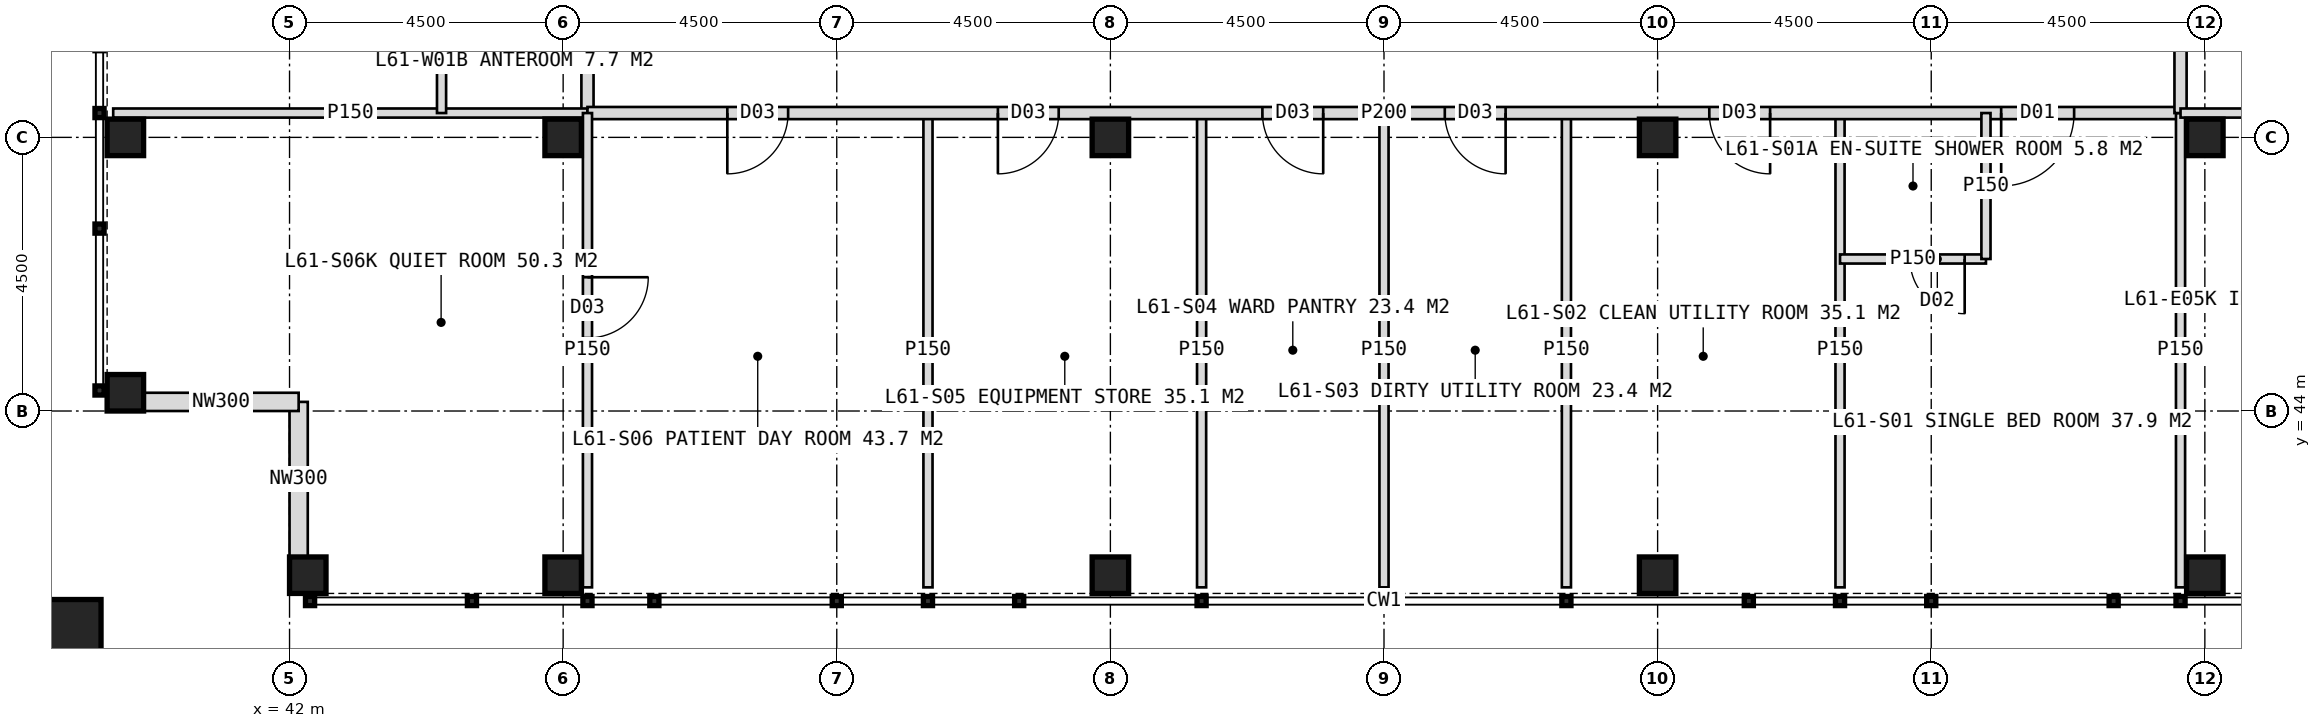
"""IFC4 building model, lengths in metres.
Left out: names, types, materials, properties, quantities, classifications, styles, units other than length and angle.
Written with IfcOpenShell. Run it as: python <this file> out.ifc"""

import sys

from ifc_helpers import new_model, si_unit, direction, frame, frame_2d, origin, origin_2d, place, context, subcontext, project, spatial, rectangle, hollow_rectangle, extrude, element, fill, save


model = new_model("IFC4")
c1 = context("Model", 3, precision=1e-05, world=origin(), true_north=direction((0.0, 1.0)))
c2 = subcontext(c1, "Body", "Model", "MODEL_VIEW")
j1 = project(units=[si_unit("LENGTHUNIT", "METRE"), si_unit("PLANEANGLEUNIT", "RADIAN")], contexts=[c1])
p1 = place(None, origin())
s1 = spatial("IfcSite", under=j1, at=p1, CompositionType="ELEMENT")
p2 = place(p1, origin())
s2 = spatial("IfcBuilding", under=s1, at=p2, CompositionType="ELEMENT")
p3 = place(p2, frame((0.0, 0.0, 254.0)))
s3 = spatial("IfcBuildingStorey", under=s2, at=p3, CompositionType="ELEMENT", Elevation=254.0)
for number, where, z_axis, x_axis in (
    (1, (46.5, 48.5, 0.0), (0.0, 0.0, 1.0), (1.0, 0.0, 0.0)),
    (2, (73.5, 48.5, 0.0), (0.0, 0.0, 1.0), (1.0, 0.0, 0.0)),
    (3, (55.5, 48.5, 0.0), (0.0, 0.0, 1.0), (1.0, 0.0, 0.0)),
    (4, (64.5, 48.5, 0.0), (0.0, 0.0, 1.0), (1.0, 0.0, 0.0)),
    (5, (42.3, 41.3, 0.0), (0.0, 0.0, 1.0), (1.0, 0.0, 0.0)),
    (6, (39.3, 44.3, 0.0), (0.0, 0.0, 1.0), (1.0, 0.0, 0.0)),
    (7, (46.5, 41.3, 0.0), (0.0, 0.0, 1.0), (1.0, 0.0, 0.0)),
    (8, (39.3, 48.5, 0.0), (0.0, 0.0, 1.0), (1.0, 0.0, 0.0)),
    (9, (55.5, 41.3, 0.0), (0.0, 0.0, 1.0), (1.0, 0.0, 0.0)),
    (10, (64.5, 41.3, 0.0), (0.0, 0.0, 1.0), (1.0, 0.0, 0.0)),
    (11, (73.5, 41.3, 0.0), (0.0, 0.0, 1.0), (1.0, 0.0, 0.0)),
):
    element("IfcColumn", number, at=place(p3, frame(where, z_axis=z_axis, x_axis=x_axis)), inside=s3, PredefinedType="COLUMN", context=c2, shape_type="SweptSolid", body=[
        extrude(hollow_rectangle(XDim=0.6, YDim=0.6, WallThickness=0.04, at=origin_2d()), origin(), (0.0, 0.0, 1.0), 4.0),
    ])
p4 = place(p3, frame((38.4, 40.4, 0.0), z_axis=(0.0, 0.0, 1.0), x_axis=(1.0, 0.0, 0.0)))
e12 = element("IfcColumn", 12, at=p4, inside=s3, PredefinedType="COLUMN", context=c2, shape_type="SweptSolid", body=[
    extrude(hollow_rectangle(XDim=1.0, YDim=1.0, WallThickness=0.06, at=origin_2d()), origin(), (0.0, 0.0, 1.0), 4.0),
])
for number, where, z_axis, x_axis in (
    (13, (42.15, 41.6, 0.0), (0.0, 0.0, 1.0), (0.0, 1.0, 0.0)),
    (14, (42.15, 44.15, 0.0), (0.0, 0.0, 1.0), (-1.0, 0.0, 0.0)),
):
    element("IfcWall", number, at=place(p3, frame(where, z_axis=z_axis, x_axis=x_axis)), inside=s3, PredefinedType="ELEMENTEDWALL", context=c2, shape_type="SweptSolid", body=[
        extrude(rectangle(XDim=2.55, YDim=0.3, at=frame_2d((1.275, 0.0))), origin(), (0.0, 0.0, 1.0), 2.95),
    ])
p5 = place(p3, frame((46.9, 48.9, 0.0), z_axis=(0.0, 0.0, 1.0), x_axis=(0.0, 1.0, 0.0)))
e15 = element("IfcWall", 15, at=p5, inside=s3, PredefinedType="PARTITIONING", context=c2, shape_type="SweptSolid", body=[
    extrude(rectangle(XDim=26.2, YDim=0.2, at=frame_2d((13.1, 0.0))), origin(), (0.0, 0.0, 1.0), 3.75),
])
p6 = place(p5, frame((1.75, 0.0, 0.0)))
e16 = element("IfcOpeningElement", 16, at=p6, cuts=e15, PredefinedType="OPENING", context=c2, shape_type="SweptSolid", body=[
    extrude(rectangle(XDim=1.2, YDim=2.2, at=frame_2d((0.6, 1.1))), frame((0.0, 0.11, 0.0), z_axis=(0.0, -1.0, 0.0), x_axis=(1.0, 0.0, 0.0)), (0.0, 0.0, 1.0), 0.22),
])
p7 = place(p5, frame((6.75, 0.0, 0.0)))
e17 = element("IfcOpeningElement", 17, at=p7, cuts=e15, PredefinedType="OPENING", context=c2, shape_type="SweptSolid", body=[
    extrude(rectangle(XDim=1.0, YDim=2.1, at=frame_2d((0.5, 1.05))), frame((0.0, 0.11, 0.0), z_axis=(0.0, -1.0, 0.0), x_axis=(1.0, 0.0, 0.0)), (0.0, 0.0, 1.0), 0.22),
])
p8 = place(p5, frame((11.1, 0.0, 0.0)))
e18 = element("IfcOpeningElement", 18, at=p8, cuts=e15, PredefinedType="OPENING", context=c2, shape_type="SweptSolid", body=[
    extrude(rectangle(XDim=1.0, YDim=2.1, at=frame_2d((0.5, 1.05))), frame((0.0, 0.11, 0.0), z_axis=(0.0, -1.0, 0.0), x_axis=(1.0, 0.0, 0.0)), (0.0, 0.0, 1.0), 0.22),
])
p9 = place(p5, frame((18.45, 0.0, 0.0)))
e19 = element("IfcOpeningElement", 19, at=p9, cuts=e15, PredefinedType="OPENING", context=c2, shape_type="SweptSolid", body=[
    extrude(rectangle(XDim=1.2, YDim=2.2, at=frame_2d((0.6, 1.1))), frame((0.0, 0.11, 0.0), z_axis=(0.0, -1.0, 0.0), x_axis=(1.0, 0.0, 0.0)), (0.0, 0.0, 1.0), 0.22),
])
p10 = place(p5, frame((23.25, 0.0, 0.0)))
e20 = element("IfcOpeningElement", 20, at=p10, cuts=e15, PredefinedType="OPENING", context=c2, shape_type="SweptSolid", body=[
    extrude(rectangle(XDim=1.2, YDim=2.2, at=frame_2d((0.6, 1.1))), frame((0.0, 0.11, 0.0), z_axis=(0.0, -1.0, 0.0), x_axis=(1.0, 0.0, 0.0)), (0.0, 0.0, 1.0), 0.22),
])
p11 = place(p3, frame((46.9, 48.9, 0.0), z_axis=(0.0, 0.0, 1.0), x_axis=(-1.0, 0.0, 0.0)))
e21 = element("IfcWall", 21, at=p11, inside=s3, PredefinedType="PARTITIONING", context=c2, shape_type="SweptSolid", body=[
    extrude(rectangle(XDim=7.8, YDim=0.15, at=frame_2d((3.9, 0.0))), origin(), (0.0, 0.0, 1.0), 3.75),
])
p12 = place(p3, frame((44.5, 48.9, 0.0), z_axis=(0.0, 0.0, 1.0), x_axis=(0.0, 1.0, 0.0)))
e22 = element("IfcWall", 22, at=p12, inside=s3, PredefinedType="PARTITIONING", context=c2, shape_type="SweptSolid", body=[
    extrude(rectangle(XDim=3.2, YDim=0.15, at=frame_2d((1.6, 0.0))), origin(), (0.0, 0.0, 1.0), 3.75),
])
p13 = place(p12, frame((1.75, 0.0, 0.0)))
e23 = element("IfcOpeningElement", 23, at=p13, cuts=e22, PredefinedType="OPENING", context=c2, shape_type="SweptSolid", body=[
    extrude(rectangle(XDim=1.2, YDim=2.2, at=frame_2d((0.6, 1.1))), frame((0.0, 0.085, 0.0), z_axis=(0.0, -1.0, 0.0), x_axis=(1.0, 0.0, 0.0)), (0.0, 0.0, 1.0), 0.17),
])
for number, where, z_axis, x_axis in (
    (24, (67.5, 48.9, 0.0), (0.0, 0.0, 1.0), (0.0, -1.0, 0.0)),
    (25, (63.0, 48.9, 0.0), (0.0, 0.0, 1.0), (0.0, -1.0, 0.0)),
):
    element("IfcWall", number, at=place(p3, frame(where, z_axis=z_axis, x_axis=x_axis)), inside=s3, PredefinedType="PARTITIONING", context=c2, shape_type="SweptSolid", body=[
        extrude(rectangle(XDim=7.8, YDim=0.15, at=frame_2d((3.9, 0.0))), origin(), (0.0, 0.0, 1.0), 3.75),
    ])
p14 = place(p3, frame((60.0, 48.9, 0.0), z_axis=(0.0, 0.0, 1.0), x_axis=(0.0, -1.0, 0.0)))
e26 = element("IfcWall", 26, at=p14, inside=s3, PredefinedType="PARTITIONING", context=c2, shape_type="SweptSolid", body=[
    extrude(rectangle(XDim=7.8, YDim=0.15, at=frame_2d((3.9, 0.0))), origin(), (0.0, 0.0, 1.0), 2.75),
])
for number, where, z_axis, x_axis in (
    (27, (57.0, 48.9, 0.0), (0.0, 0.0, 1.0), (0.0, -1.0, 0.0)),
    (28, (52.5, 48.9, 0.0), (0.0, 0.0, 1.0), (0.0, -1.0, 0.0)),
):
    element("IfcWall", number, at=place(p3, frame(where, z_axis=z_axis, x_axis=x_axis)), inside=s3, PredefinedType="PARTITIONING", context=c2, shape_type="SweptSolid", body=[
        extrude(rectangle(XDim=7.8, YDim=0.15, at=frame_2d((3.9, 0.0))), origin(), (0.0, 0.0, 1.0), 3.75),
    ])
p15 = place(p3, frame((73.1, 48.9, 0.0), z_axis=(0.0, 0.0, 1.0), x_axis=(-1.0, 0.0, 0.0)))
e29 = element("IfcWall", 29, at=p15, inside=s3, PredefinedType="PARTITIONING", context=c2, shape_type="SweptSolid", body=[
    extrude(rectangle(XDim=26.2, YDim=0.2, at=frame_2d((13.1, 0.0))), origin(), (0.0, 0.0, 1.0), 3.75),
])
p16 = place(p15, frame((1.75, 0.0, 0.0)))
e30 = element("IfcOpeningElement", 30, at=p16, cuts=e29, PredefinedType="OPENING", context=c2, shape_type="SweptSolid", body=[
    extrude(rectangle(XDim=1.2, YDim=2.2, at=frame_2d((0.6, 1.1))), frame((0.0, 0.11, 0.0), z_axis=(0.0, -1.0, 0.0), x_axis=(1.0, 0.0, 0.0)), (0.0, 0.0, 1.0), 0.22),
])
p17 = place(p15, frame((6.75, 0.0, 0.0)))
e31 = element("IfcOpeningElement", 31, at=p17, cuts=e29, PredefinedType="OPENING", context=c2, shape_type="SweptSolid", body=[
    extrude(rectangle(XDim=1.0, YDim=2.1, at=frame_2d((0.5, 1.05))), frame((0.0, 0.11, 0.0), z_axis=(0.0, -1.0, 0.0), x_axis=(1.0, 0.0, 0.0)), (0.0, 0.0, 1.0), 0.22),
])
p18 = place(p15, frame((11.1, 0.0, 0.0)))
e32 = element("IfcOpeningElement", 32, at=p18, cuts=e29, PredefinedType="OPENING", context=c2, shape_type="SweptSolid", body=[
    extrude(rectangle(XDim=1.0, YDim=2.1, at=frame_2d((0.5, 1.05))), frame((0.0, 0.11, 0.0), z_axis=(0.0, -1.0, 0.0), x_axis=(1.0, 0.0, 0.0)), (0.0, 0.0, 1.0), 0.22),
])
p19 = place(p15, frame((14.1, 0.0, 0.0)))
e33 = element("IfcOpeningElement", 33, at=p19, cuts=e29, PredefinedType="OPENING", context=c2, shape_type="SweptSolid", body=[
    extrude(rectangle(XDim=1.0, YDim=2.1, at=frame_2d((0.5, 1.05))), frame((0.0, 0.11, 0.0), z_axis=(0.0, -1.0, 0.0), x_axis=(1.0, 0.0, 0.0)), (0.0, 0.0, 1.0), 0.22),
])
p20 = place(p15, frame((18.45, 0.0, 0.0)))
e34 = element("IfcOpeningElement", 34, at=p20, cuts=e29, PredefinedType="OPENING", context=c2, shape_type="SweptSolid", body=[
    extrude(rectangle(XDim=1.0, YDim=2.1, at=frame_2d((0.5, 1.05))), frame((0.0, 0.11, 0.0), z_axis=(0.0, -1.0, 0.0), x_axis=(1.0, 0.0, 0.0)), (0.0, 0.0, 1.0), 0.22),
])
p21 = place(p15, frame((22.9, 0.0, 0.0)))
e35 = element("IfcOpeningElement", 35, at=p21, cuts=e29, PredefinedType="OPENING", context=c2, shape_type="SweptSolid", body=[
    extrude(rectangle(XDim=1.0, YDim=2.1, at=frame_2d((0.5, 1.05))), frame((0.0, 0.11, 0.0), z_axis=(0.0, -1.0, 0.0), x_axis=(1.0, 0.0, 0.0)), (0.0, 0.0, 1.0), 0.22),
])
p22 = place(p3, frame((73.1, 48.9, 0.0), z_axis=(0.0, 0.0, 1.0), x_axis=(0.0, -1.0, 0.0)))
e36 = element("IfcWall", 36, at=p22, inside=s3, PredefinedType="PARTITIONING", context=c2, shape_type="SweptSolid", body=[
    extrude(rectangle(XDim=7.8, YDim=0.15, at=frame_2d((3.9, 0.0))), origin(), (0.0, 0.0, 1.0), 3.75),
])
p23 = place(p3, frame((69.9, 46.5, 0.0), z_axis=(0.0, 0.0, 1.0), x_axis=(-1.0, 0.0, 0.0)))
e37 = element("IfcWall", 37, at=p23, inside=s3, PredefinedType="PARTITIONING", context=c2, shape_type="SweptSolid", body=[
    extrude(rectangle(XDim=2.4, YDim=0.15, at=frame_2d((1.2, 0.0))), origin(), (0.0, 0.0, 1.0), 3.75),
])
p24 = place(p23, frame((0.35, 0.0, 0.0)))
e38 = element("IfcOpeningElement", 38, at=p24, cuts=e37, PredefinedType="OPENING", context=c2, shape_type="SweptSolid", body=[
    extrude(rectangle(XDim=0.9, YDim=2.1, at=frame_2d((0.45, 1.05))), frame((0.0, 0.085, 0.0), z_axis=(0.0, -1.0, 0.0), x_axis=(1.0, 0.0, 0.0)), (0.0, 0.0, 1.0), 0.17),
])
p25 = place(p3, frame((69.9, 48.9, 0.0), z_axis=(0.0, 0.0, 1.0), x_axis=(0.0, -1.0, 0.0)))
e39 = element("IfcWall", 39, at=p25, inside=s3, PredefinedType="PARTITIONING", context=c2, shape_type="SweptSolid", body=[
    extrude(rectangle(XDim=2.4, YDim=0.15, at=frame_2d((1.2, 0.0))), origin(), (0.0, 0.0, 1.0), 3.75),
])
p26 = place(p3, frame((46.9, 48.9, 0.0), z_axis=(0.0, 0.0, 1.0), x_axis=(0.0, -1.0, 0.0)))
e40 = element("IfcWall", 40, at=p26, inside=s3, PredefinedType="PARTITIONING", context=c2, shape_type="SweptSolid", body=[
    extrude(rectangle(XDim=7.8, YDim=0.15, at=frame_2d((3.9, 0.0))), origin(), (0.0, 0.0, 1.0), 3.75),
])
p27 = place(p26, frame((2.7, 0.0, 0.0)))
e41 = element("IfcOpeningElement", 41, at=p27, cuts=e40, PredefinedType="OPENING", context=c2, shape_type="SweptSolid", body=[
    extrude(rectangle(XDim=1.0, YDim=2.1, at=frame_2d((0.5, 1.05))), frame((0.0, 0.085, 0.0), z_axis=(0.0, -1.0, 0.0), x_axis=(1.0, 0.0, 0.0)), (0.0, 0.0, 1.0), 0.17),
])
p28 = place(p3, frame((73.1, 71.0, 0.0), z_axis=(0.0, 0.0, 1.0), x_axis=(0.0, -1.0, 0.0)))
e42 = element("IfcWall", 42, at=p28, inside=s3, PredefinedType="PARTITIONING", context=c2, shape_type="SweptSolid", body=[
    extrude(rectangle(XDim=22.1, YDim=0.2, at=frame_2d((11.05, 0.0))), origin(), (0.0, 0.0, 1.0), 3.75),
])
p29 = place(p28, frame((2.65, 0.0, 0.0)))
e43 = element("IfcOpeningElement", 43, at=p29, cuts=e42, PredefinedType="OPENING", context=c2, shape_type="SweptSolid", body=[
    extrude(rectangle(XDim=1.0, YDim=2.1, at=frame_2d((0.5, 1.05))), frame((0.0, 0.11, 0.0), z_axis=(0.0, -1.0, 0.0), x_axis=(1.0, 0.0, 0.0)), (0.0, 0.0, 1.0), 0.22),
])
p30 = place(p28, frame((7.0, 0.0, 0.0)))
e44 = element("IfcOpeningElement", 44, at=p30, cuts=e42, PredefinedType="OPENING", context=c2, shape_type="SweptSolid", body=[
    extrude(rectangle(XDim=1.0, YDim=2.1, at=frame_2d((0.5, 1.05))), frame((0.0, 0.11, 0.0), z_axis=(0.0, -1.0, 0.0), x_axis=(1.0, 0.0, 0.0)), (0.0, 0.0, 1.0), 0.22),
])
p31 = place(p28, frame((14.35, 0.0, 0.0)))
e45 = element("IfcOpeningElement", 45, at=p31, cuts=e42, PredefinedType="OPENING", context=c2, shape_type="SweptSolid", body=[
    extrude(rectangle(XDim=1.2, YDim=2.2, at=frame_2d((0.6, 1.1))), frame((0.0, 0.11, 0.0), z_axis=(0.0, -1.0, 0.0), x_axis=(1.0, 0.0, 0.0)), (0.0, 0.0, 1.0), 0.22),
])
p32 = place(p28, frame((19.15, 0.0, 0.0)))
e46 = element("IfcOpeningElement", 46, at=p32, cuts=e42, PredefinedType="OPENING", context=c2, shape_type="SweptSolid", body=[
    extrude(rectangle(XDim=1.2, YDim=2.2, at=frame_2d((0.6, 1.1))), frame((0.0, 0.11, 0.0), z_axis=(0.0, -1.0, 0.0), x_axis=(1.0, 0.0, 0.0)), (0.0, 0.0, 1.0), 0.22),
])
p33 = place(p3, frame((73.1, 48.9, 0.0), z_axis=(0.0, 0.0, 1.0), x_axis=(1.0, 0.0, 0.0)))
e47 = element("IfcWall", 47, at=p33, inside=s3, PredefinedType="PARTITIONING", context=c2, shape_type="SweptSolid", body=[
    extrude(rectangle(XDim=7.8, YDim=0.15, at=frame_2d((3.9, 0.0))), origin(), (0.0, 0.0, 1.0), 3.75),
])
p34 = place(p33, frame((2.7, 0.0, 0.0)))
e48 = element("IfcOpeningElement", 48, at=p34, cuts=e47, PredefinedType="OPENING", context=c2, shape_type="SweptSolid", body=[
    extrude(rectangle(XDim=1.0, YDim=2.1, at=frame_2d((0.5, 1.05))), frame((0.0, 0.085, 0.0), z_axis=(0.0, -1.0, 0.0), x_axis=(1.0, 0.0, 0.0)), (0.0, 0.0, 1.0), 0.17),
])
p35 = place(p16, origin())
e49 = element("IfcDoor", 49, at=p35, inside=s3, OperationType="SINGLE_SWING_RIGHT", PredefinedType="DOOR", context=c2, shape_type="SweptSolid", body=[
    extrude(rectangle(XDim=1.2, YDim=2.2, at=frame_2d((0.6, 1.1))), frame((0.0, 0.025, 0.0), z_axis=(0.0, -1.0, 0.0), x_axis=(1.0, 0.0, 0.0)), (0.0, 0.0, 1.0), 0.05),
])
fill(e30, e49)
p36 = place(p24, origin())
e50 = element("IfcDoor", 50, at=p36, inside=s3, OperationType="SINGLE_SWING_LEFT", PredefinedType="DOOR", context=c2, shape_type="SweptSolid", body=[
    extrude(rectangle(XDim=0.9, YDim=2.1, at=frame_2d((0.45, 1.05))), frame((0.0, 0.025, 0.0), z_axis=(0.0, -1.0, 0.0), x_axis=(1.0, 0.0, 0.0)), (0.0, 0.0, 1.0), 0.05),
])
fill(e38, e50)
p37 = place(p17, origin())
e51 = element("IfcDoor", 51, at=p37, inside=s3, OperationType="SINGLE_SWING_LEFT", PredefinedType="DOOR", context=c2, shape_type="SweptSolid", body=[
    extrude(rectangle(XDim=1.0, YDim=2.1, at=frame_2d((0.5, 1.05))), frame((0.0, 0.025, 0.0), z_axis=(0.0, -1.0, 0.0), x_axis=(1.0, 0.0, 0.0)), (0.0, 0.0, 1.0), 0.05),
])
fill(e31, e51)
p38 = place(p18, origin())
e52 = element("IfcDoor", 52, at=p38, inside=s3, OperationType="SINGLE_SWING_LEFT", PredefinedType="DOOR", context=c2, shape_type="SweptSolid", body=[
    extrude(rectangle(XDim=1.0, YDim=2.1, at=frame_2d((0.5, 1.05))), frame((0.0, 0.025, 0.0), z_axis=(0.0, -1.0, 0.0), x_axis=(1.0, 0.0, 0.0)), (0.0, 0.0, 1.0), 0.05),
])
fill(e32, e52)
p39 = place(p19, origin())
e53 = element("IfcDoor", 53, at=p39, inside=s3, OperationType="SINGLE_SWING_LEFT", PredefinedType="DOOR", context=c2, shape_type="SweptSolid", body=[
    extrude(rectangle(XDim=1.0, YDim=2.1, at=frame_2d((0.5, 1.05))), frame((0.0, 0.025, 0.0), z_axis=(0.0, -1.0, 0.0), x_axis=(1.0, 0.0, 0.0)), (0.0, 0.0, 1.0), 0.05),
])
fill(e33, e53)
p40 = place(p20, origin())
e54 = element("IfcDoor", 54, at=p40, inside=s3, OperationType="SINGLE_SWING_RIGHT", PredefinedType="DOOR", context=c2, shape_type="SweptSolid", body=[
    extrude(rectangle(XDim=1.0, YDim=2.1, at=frame_2d((0.5, 1.05))), frame((0.0, 0.025, 0.0), z_axis=(0.0, -1.0, 0.0), x_axis=(1.0, 0.0, 0.0)), (0.0, 0.0, 1.0), 0.05),
])
fill(e34, e54)
p41 = place(p27, origin())
e55 = element("IfcDoor", 55, at=p41, inside=s3, OperationType="SINGLE_SWING_LEFT", PredefinedType="DOOR", context=c2, shape_type="SweptSolid", body=[
    extrude(rectangle(XDim=1.0, YDim=2.1, at=frame_2d((0.5, 1.05))), frame((0.0, 0.025, 0.0), z_axis=(0.0, -1.0, 0.0), x_axis=(1.0, 0.0, 0.0)), (0.0, 0.0, 1.0), 0.05),
])
fill(e41, e55)
p42 = place(p21, origin())
e56 = element("IfcDoor", 56, at=p42, inside=s3, OperationType="SINGLE_SWING_RIGHT", PredefinedType="DOOR", context=c2, shape_type="SweptSolid", body=[
    extrude(rectangle(XDim=1.0, YDim=2.1, at=frame_2d((0.5, 1.05))), frame((0.0, 0.025, 0.0), z_axis=(0.0, -1.0, 0.0), x_axis=(1.0, 0.0, 0.0)), (0.0, 0.0, 1.0), 0.05),
])
fill(e35, e56)
save(model, sys.argv[1])
